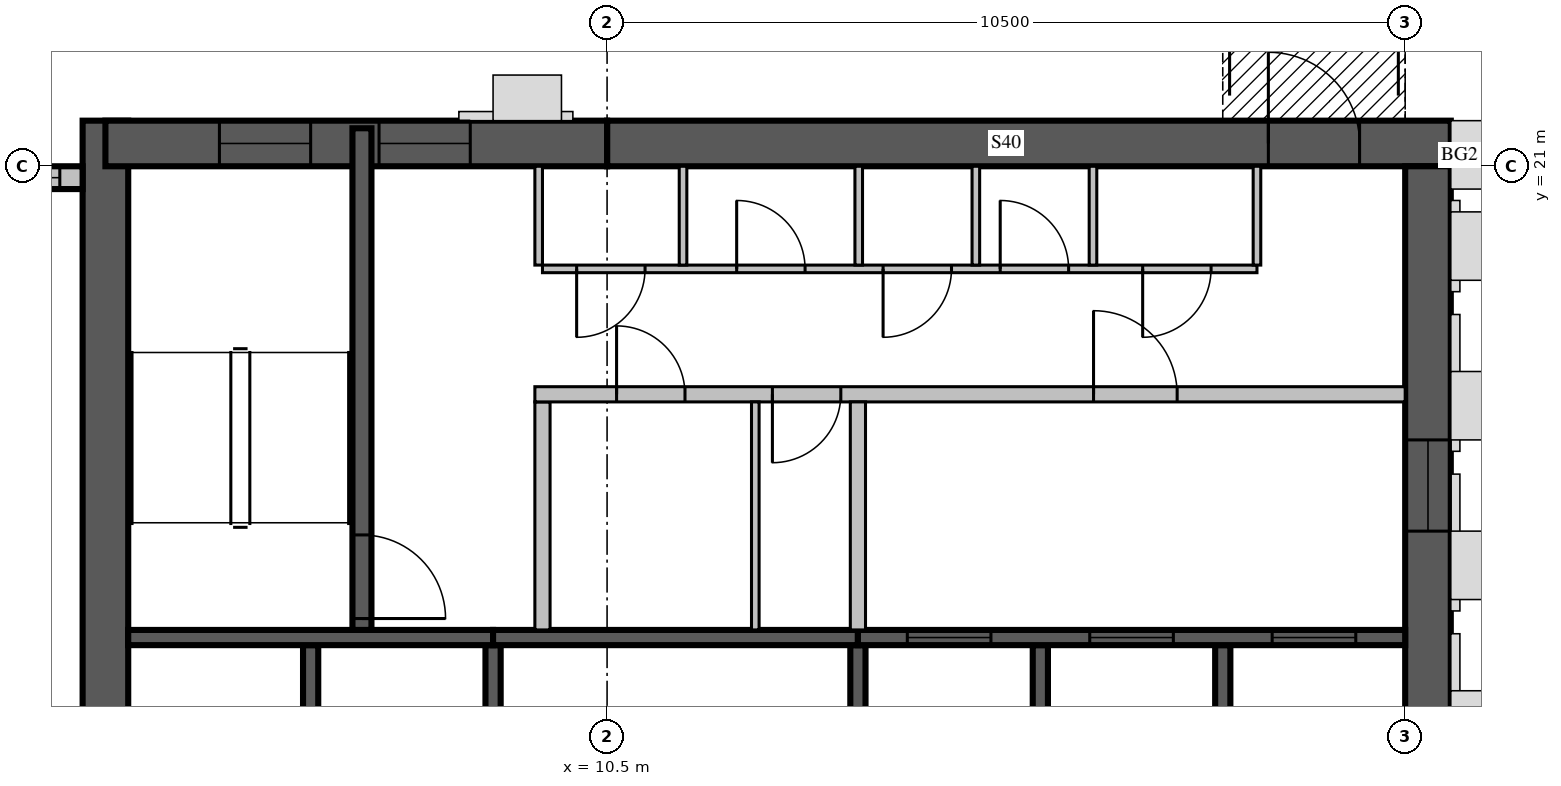
"""IFC4 building model, lengths in metres.
Left out: names, types, materials, properties, quantities, classifications, styles, units other than length and angle.
Written with IfcOpenShell. Run it as: python <this file> out.ifc"""

import sys

from ifc_helpers import new_model, si_unit, direction, frame, frame_2d, origin, place, context, subcontext, project, spatial, rectangle, extrude, source, transform, mapped, element, fill, save


model = new_model("IFC4")
c1 = context("Model", 3, precision=1e-05, world=origin(), true_north=direction((0.0, 1.0)))
c2 = subcontext(c1, "Body", "Model", "MODEL_VIEW")
j1 = project(units=[si_unit("LENGTHUNIT", "METRE"), si_unit("PLANEANGLEUNIT", "RADIAN")], contexts=[c1])
p1 = place(None, origin())
s1 = spatial("IfcSite", under=j1, at=p1, CompositionType="ELEMENT")
p2 = place(p1, origin())
s2 = spatial("IfcBuilding", under=s1, at=p2, CompositionType="ELEMENT")
p3 = place(p2, frame((0.0, 0.0, 323.0)))
s3 = spatial("IfcBuildingStorey", under=s2, at=p3, CompositionType="ELEMENT", Elevation=323.0)
m1 = source(origin(), c2, "Body", "SweptSolid", [
    extrude(rectangle(XDim=17.4, YDim=0.6, at=frame_2d((8.7, 0.0))), origin(), (0.0, 0.0, 1.0), 3.5),
])
p4 = place(p3, frame((3.9, 4.2, 0.0), z_axis=(0.0, 0.0, 1.0), x_axis=(0.0, 1.0, 0.0)))
e1 = element("IfcWall", 1, at=p4, inside=s3, PredefinedType="SHEAR", context=c2, shape_type="MappedRepresentation", body=[
    mapped(m1, transform((0.0, 0.0, 0.0), scale=1.0)),
])
m2 = source(origin(), c2, "Body", "SweptSolid", [
    extrude(rectangle(XDim=2.2, YDim=2.1, at=frame_2d((1.1, 1.05))), frame((0.0, 0.31, 0.0), z_axis=(0.0, -1.0, 0.0), x_axis=(1.0, 0.0, 0.0)), (0.0, 0.0, 1.0), 0.62),
])
p5 = place(p4, frame((4.2, 0.0, 0.0)))
e2 = element("IfcOpeningElement", 2, at=p5, cuts=e1, PredefinedType="OPENING", context=c2, shape_type="MappedRepresentation", body=[
    mapped(m2, transform((0.0, 0.0, 0.0), scale=1.0)),
])
m3 = source(origin(), c2, "Body", "SweptSolid", [
    extrude(rectangle(XDim=11.1, YDim=0.6, at=frame_2d((5.55, 0.0))), origin(), (0.0, 0.0, 1.0), 3.5),
])
p6 = place(p3, frame((10.5, 21.3, 0.0), z_axis=(0.0, 0.0, 1.0), x_axis=(1.0, 0.0, 0.0)))
e3 = element("IfcWall", 3, at=p6, inside=s3, PredefinedType="SHEAR", context=c2, shape_type="MappedRepresentation", body=[
    mapped(m3, transform((0.0, 0.0, 0.0), scale=1.0)),
])
m4 = source(origin(), c2, "Body", "SweptSolid", [
    extrude(rectangle(XDim=1.2, YDim=2.1, at=frame_2d((0.6, 1.05))), frame((0.0, 0.31, 0.0), z_axis=(0.0, -1.0, 0.0), x_axis=(1.0, 0.0, 0.0)), (0.0, 0.0, 1.0), 0.62),
])
p7 = place(p6, frame((8.7, 0.0, 0.0)))
e4 = element("IfcOpeningElement", 4, at=p7, cuts=e3, PredefinedType="OPENING", context=c2, shape_type="MappedRepresentation", body=[
    mapped(m4, transform((0.0, 0.0, 0.0), scale=1.0)),
])
m5 = source(origin(), c2, "Body", "SweptSolid", [
    extrude(rectangle(XDim=10.5, YDim=0.6, at=frame_2d((5.25, 0.0))), origin(), (0.0, 0.0, 1.0), 3.5),
])
p8 = place(p3, frame((21.3, 10.5, 0.0), z_axis=(0.0, 0.0, 1.0), x_axis=(0.0, 1.0, 0.0)))
e5 = element("IfcWall", 5, at=p8, inside=s3, PredefinedType="SHEAR", context=c2, shape_type="MappedRepresentation", body=[
    mapped(m5, transform((0.0, 0.0, 0.0), scale=1.0)),
])
m6 = source(origin(), c2, "Body", "SweptSolid", [
    extrude(rectangle(XDim=1.2, YDim=2.4, at=frame_2d((0.6, 1.2))), frame((0.0, 0.31, 0.0), z_axis=(0.0, -1.0, 0.0), x_axis=(1.0, 0.0, 0.0)), (0.0, 0.0, 1.0), 0.62),
])
p9 = place(p8, frame((5.7, 0.0, 0.6)))
e6 = element("IfcOpeningElement", 6, at=p9, cuts=e5, PredefinedType="OPENING", context=c2, shape_type="MappedRepresentation", body=[
    mapped(m6, transform((0.0, 0.0, 0.0), scale=1.0)),
])
m7 = source(origin(), c2, "Body", "SweptSolid", [
    extrude(rectangle(XDim=6.6, YDim=0.6, at=frame_2d((3.3, 0.0))), origin(), (0.0, 0.0, 1.0), 3.5),
])
p10 = place(p3, frame((3.9, 21.3, 0.0), z_axis=(0.0, 0.0, 1.0), x_axis=(1.0, 0.0, 0.0)))
e7 = element("IfcWall", 7, at=p10, inside=s3, PredefinedType="SHEAR", context=c2, shape_type="MappedRepresentation", body=[
    mapped(m7, transform((0.0, 0.0, 0.0), scale=1.0)),
])
p11 = place(p10, frame((1.5, 0.0, 0.6)))
e8 = element("IfcOpeningElement", 8, at=p11, cuts=e7, PredefinedType="OPENING", context=c2, shape_type="MappedRepresentation", body=[
    mapped(m6, transform((0.0, 0.0, 0.0), scale=1.0)),
])
p12 = place(p10, frame((3.6, 0.0, 0.6)))
e9 = element("IfcOpeningElement", 9, at=p12, cuts=e7, PredefinedType="OPENING", context=c2, shape_type="MappedRepresentation", body=[
    mapped(m6, transform((0.0, 0.0, 0.0), scale=1.0)),
])
m8 = source(origin(), c2, "Body", "SweptSolid", [
    extrude(rectangle(XDim=2.9, YDim=0.3, at=frame_2d((1.45, 0.0))), origin(), (0.0, 0.0, 1.0), 3.1),
])
p13 = place(p3, frame((3.6, 20.85, 0.0), z_axis=(0.0, 0.0, 1.0), x_axis=(-1.0, 0.0, 0.0)))
e10 = element("IfcWall", 10, at=p13, inside=s3, PredefinedType="STANDARD", context=c2, shape_type="MappedRepresentation", body=[
    mapped(m8, transform((0.0, 0.0, 0.0), scale=1.0)),
])
m9 = source(origin(), c2, "Body", "SweptSolid", [
    extrude(rectangle(XDim=2.4, YDim=2.0, at=frame_2d((1.2, 1.0))), frame((0.0, 0.16, 0.0), z_axis=(0.0, -1.0, 0.0), x_axis=(1.0, 0.0, 0.0)), (0.0, 0.0, 1.0), 0.32),
])
p14 = place(p13, frame((0.3, 0.0, 0.6)))
e11 = element("IfcOpeningElement", 11, at=p14, cuts=e10, PredefinedType="OPENING", context=c2, shape_type="MappedRepresentation", body=[
    mapped(m9, transform((0.0, 0.0, 0.0), scale=1.0)),
])
m10 = source(origin(), c2, "Body", "SweptSolid", [
    extrude(rectangle(XDim=3.0, YDim=0.2, at=frame_2d((1.5, 0.0))), origin(), (0.0, 0.0, 1.0), 3.5),
])
p15 = place(p3, frame((6.6, 11.7, 0.0), z_axis=(0.0, 0.0, 1.0), x_axis=(0.0, 1.0, 0.0)))
e12 = element("IfcWall", 12, at=p15, inside=s3, PredefinedType="SOLIDWALL", context=c2, shape_type="MappedRepresentation", body=[
    mapped(m10, transform((0.0, 0.0, 0.0), scale=1.0)),
])
m11 = source(origin(), c2, "Body", "SweptSolid", [
    extrude(rectangle(XDim=3.0, YDim=0.2, at=frame_2d((1.5, 0.0))), origin(), (0.0, 0.0, 1.0), 3.1),
])
for number, where, z_axis, x_axis in (
    (13, (9.0, 11.7, 0.0), (0.0, 0.0, 1.0), (0.0, 1.0, 0.0)),
    (14, (13.8, 11.7, 0.0), (0.0, 0.0, 1.0), (0.0, 1.0, 0.0)),
):
    element("IfcWall", number, at=place(p3, frame(where, z_axis=z_axis, x_axis=x_axis)), inside=s3, PredefinedType="SOLIDWALL", context=c2, shape_type="MappedRepresentation", body=[
        mapped(m11, transform((0.0, 0.0, 0.0), scale=1.0)),
    ])
for number, where, z_axis, x_axis in (
    (15, (16.2, 11.7, 0.0), (0.0, 0.0, 1.0), (0.0, 1.0, 0.0)),
    (16, (18.6, 11.7, 0.0), (0.0, 0.0, 1.0), (0.0, 1.0, 0.0)),
):
    element("IfcWall", number, at=place(p3, frame(where, z_axis=z_axis, x_axis=x_axis)), inside=s3, PredefinedType="SOLIDWALL", context=c2, shape_type="MappedRepresentation", body=[
        mapped(m10, transform((0.0, 0.0, 0.0), scale=1.0)),
    ])
m12 = source(origin(), c2, "Body", "SweptSolid", [
    extrude(rectangle(XDim=4.8, YDim=0.2, at=frame_2d((2.4, 0.0))), origin(), (0.0, 0.0, 1.0), 3.5),
])
p16 = place(p3, frame((4.2, 14.8, 0.0), z_axis=(0.0, 0.0, 1.0), x_axis=(1.0, 0.0, 0.0)))
e17 = element("IfcWall", 17, at=p16, inside=s3, PredefinedType="SOLIDWALL", context=c2, shape_type="MappedRepresentation", body=[
    mapped(m12, transform((0.0, 0.0, 0.0), scale=1.0)),
])
m13 = source(origin(), c2, "Body", "SweptSolid", [
    extrude(rectangle(XDim=4.8, YDim=0.2, at=frame_2d((2.4, 0.0))), origin(), (0.0, 0.0, 1.0), 3.1),
])
p17 = place(p3, frame((9.0, 14.8, 0.0), z_axis=(0.0, 0.0, 1.0), x_axis=(1.0, 0.0, 0.0)))
e18 = element("IfcWall", 18, at=p17, inside=s3, PredefinedType="SOLIDWALL", context=c2, shape_type="MappedRepresentation", body=[
    mapped(m13, transform((0.0, 0.0, 0.0), scale=1.0)),
])
m14 = source(origin(), c2, "Body", "SweptSolid", [
    extrude(rectangle(XDim=7.2, YDim=0.2, at=frame_2d((3.6, 0.0))), origin(), (0.0, 0.0, 1.0), 3.5),
])
p18 = place(p3, frame((13.8, 14.8, 0.0), z_axis=(0.0, 0.0, 1.0), x_axis=(1.0, 0.0, 0.0)))
e19 = element("IfcWall", 19, at=p18, inside=s3, PredefinedType="SOLIDWALL", context=c2, shape_type="MappedRepresentation", body=[
    mapped(m14, transform((0.0, 0.0, 0.0), scale=1.0)),
])
m15 = source(origin(), c2, "Body", "SweptSolid", [
    extrude(rectangle(XDim=1.1, YDim=2.1, at=frame_2d((0.55, 1.05))), frame((0.0, 0.11, 0.0), z_axis=(0.0, -1.0, 0.0), x_axis=(1.0, 0.0, 0.0)), (0.0, 0.0, 1.0), 0.22),
])
p19 = place(p18, frame((0.65, 0.0, 0.0)))
e20 = element("IfcOpeningElement", 20, at=p19, cuts=e19, PredefinedType="OPENING", context=c2, shape_type="MappedRepresentation", body=[
    mapped(m15, transform((0.0, 0.0, 0.0), scale=1.0)),
])
p20 = place(p18, frame((3.05, 0.0, 0.0)))
e21 = element("IfcOpeningElement", 21, at=p20, cuts=e19, PredefinedType="OPENING", context=c2, shape_type="MappedRepresentation", body=[
    mapped(m15, transform((0.0, 0.0, 0.0), scale=1.0)),
])
p21 = place(p18, frame((5.45, 0.0, 0.0)))
e22 = element("IfcOpeningElement", 22, at=p21, cuts=e19, PredefinedType="OPENING", context=c2, shape_type="MappedRepresentation", body=[
    mapped(m15, transform((0.0, 0.0, 0.0), scale=1.0)),
])
m16 = source(origin(), c2, "Body", "SweptSolid", [
    extrude(rectangle(XDim=6.6, YDim=0.25, at=frame_2d((3.3, 0.0))), origin(), (0.0, 0.0, 1.0), 3.1),
])
p22 = place(p3, frame((7.275, 14.9, 0.0), z_axis=(0.0, 0.0, 1.0), x_axis=(0.0, 1.0, 0.0)))
e23 = element("IfcWall", 23, at=p22, inside=s3, PredefinedType="SOLIDWALL", context=c2, shape_type="MappedRepresentation", body=[
    mapped(m16, transform((0.0, 0.0, 0.0), scale=1.0)),
])
m17 = source(origin(), c2, "Body", "SweptSolid", [
    extrude(rectangle(XDim=1.1, YDim=2.1, at=frame_2d((0.55, 1.05))), frame((0.0, 0.135, 0.0), z_axis=(0.0, -1.0, 0.0), x_axis=(1.0, 0.0, 0.0)), (0.0, 0.0, 1.0), 0.27),
])
p23 = place(p22, frame((0.15, 0.0, 0.0)))
e24 = element("IfcOpeningElement", 24, at=p23, cuts=e23, PredefinedType="OPENING", context=c2, shape_type="MappedRepresentation", body=[
    mapped(m17, transform((0.0, 0.0, 0.0), scale=1.0)),
])
m18 = source(origin(), c2, "Body", "SweptSolid", [
    extrude(rectangle(XDim=3.0, YDim=0.2, at=frame_2d((1.5, 0.0))), origin(), (0.0, 0.0, 1.0), 3.1),
])
p24 = place(p3, frame((9.65, 14.9, 0.0), z_axis=(0.0, 0.0, 1.0), x_axis=(0.0, 1.0, 0.0)))
e25 = element("IfcWall", 25, at=p24, inside=s3, PredefinedType="PARTITIONING", context=c2, shape_type="MappedRepresentation", body=[
    mapped(m18, transform((0.0, 0.0, 0.0), scale=1.0)),
])
m19 = source(origin(), c2, "Body", "SweptSolid", [
    extrude(rectangle(XDim=11.45, YDim=0.2, at=frame_2d((5.725, 0.0))), origin(), (0.0, 0.0, 1.0), 3.1),
])
p25 = place(p3, frame((9.55, 18.0, 0.0), z_axis=(0.0, 0.0, 1.0), x_axis=(1.0, 0.0, 0.0)))
e26 = element("IfcWall", 26, at=p25, inside=s3, PredefinedType="PARTITIONING", context=c2, shape_type="MappedRepresentation", body=[
    mapped(m19, transform((0.0, 0.0, 0.0), scale=1.0)),
])
m20 = source(origin(), c2, "Body", "SweptSolid", [
    extrude(rectangle(XDim=0.9, YDim=2.1, at=frame_2d((0.45, 1.05))), frame((0.0, 0.11, 0.0), z_axis=(0.0, -1.0, 0.0), x_axis=(1.0, 0.0, 0.0)), (0.0, 0.0, 1.0), 0.22),
])
p26 = place(p25, frame((1.075, 0.0, 0.0)))
e27 = element("IfcOpeningElement", 27, at=p26, cuts=e26, PredefinedType="OPENING", context=c2, shape_type="MappedRepresentation", body=[
    mapped(m20, transform((0.0, 0.0, 0.0), scale=1.0)),
])
p27 = place(p25, frame((3.125, 0.0, 0.0)))
e28 = element("IfcOpeningElement", 28, at=p27, cuts=e26, PredefinedType="OPENING", context=c2, shape_type="MappedRepresentation", body=[
    mapped(m20, transform((0.0, 0.0, 0.0), scale=1.0)),
])
p28 = place(p25, frame((7.35, 0.0, 0.0)))
e29 = element("IfcOpeningElement", 29, at=p28, cuts=e26, PredefinedType="OPENING", context=c2, shape_type="MappedRepresentation", body=[
    mapped(m15, transform((0.0, 0.0, 0.0), scale=1.0)),
])
m21 = source(origin(), c2, "Body", "SweptSolid", [
    extrude(rectangle(XDim=9.4, YDim=0.1, at=frame_2d((4.7, 0.0))), origin(), (0.0, 0.0, 1.0), 3.1),
])
p29 = place(p3, frame((9.65, 19.65, 0.0), z_axis=(0.0, 0.0, 1.0), x_axis=(1.0, 0.0, 0.0)))
e30 = element("IfcWall", 30, at=p29, inside=s3, PredefinedType="PARTITIONING", context=c2, shape_type="MappedRepresentation", body=[
    mapped(m21, transform((0.0, 0.0, 0.0), scale=1.0)),
])
m22 = source(origin(), c2, "Body", "SweptSolid", [
    extrude(rectangle(XDim=0.9, YDim=2.1, at=frame_2d((0.45, 1.05))), frame((0.0, 0.06, 0.0), z_axis=(0.0, -1.0, 0.0), x_axis=(1.0, 0.0, 0.0)), (0.0, 0.0, 1.0), 0.12),
])
p30 = place(p29, frame((0.45, 0.0, 0.0)))
e31 = element("IfcOpeningElement", 31, at=p30, cuts=e30, PredefinedType="OPENING", context=c2, shape_type="MappedRepresentation", body=[
    mapped(m22, transform((0.0, 0.0, 0.0), scale=1.0)),
])
p31 = place(p29, frame((2.555, 0.0, 0.0)))
e32 = element("IfcOpeningElement", 32, at=p31, cuts=e30, PredefinedType="OPENING", context=c2, shape_type="MappedRepresentation", body=[
    mapped(m22, transform((0.0, 0.0, 0.0), scale=1.0)),
])
p32 = place(p29, frame((4.481, 0.0, 0.0)))
e33 = element("IfcOpeningElement", 33, at=p32, cuts=e30, PredefinedType="OPENING", context=c2, shape_type="MappedRepresentation", body=[
    mapped(m22, transform((0.0, 0.0, 0.0), scale=1.0)),
])
p33 = place(p29, frame((6.022, 0.0, 0.0)))
e34 = element("IfcOpeningElement", 34, at=p33, cuts=e30, PredefinedType="OPENING", context=c2, shape_type="MappedRepresentation", body=[
    mapped(m22, transform((0.0, 0.0, 0.0), scale=1.0)),
])
p34 = place(p29, frame((7.896, 0.0, 0.0)))
e35 = element("IfcOpeningElement", 35, at=p34, cuts=e30, PredefinedType="OPENING", context=c2, shape_type="MappedRepresentation", body=[
    mapped(m22, transform((0.0, 0.0, 0.0), scale=1.0)),
])
m23 = source(origin(), c2, "Body", "SweptSolid", [
    extrude(rectangle(XDim=1.3, YDim=0.1, at=frame_2d((0.65, 0.0))), origin(), (0.0, 0.0, 1.0), 3.1),
])
for number, where, z_axis, x_axis in (
    (36, (11.499, 19.7, 0.0), (0.0, 0.0, 1.0), (0.0, 1.0, 0.0)),
    (37, (13.811, 19.7, 0.0), (0.0, 0.0, 1.0), (0.0, 1.0, 0.0)),
    (38, (15.352, 19.7, 0.0), (0.0, 0.0, 1.0), (0.0, 1.0, 0.0)),
    (39, (16.893, 19.7, 0.0), (0.0, 0.0, 1.0), (0.0, 1.0, 0.0)),
    (40, (9.6, 19.7, 0.0), (0.0, 0.0, 1.0), (0.0, 1.0, 0.0)),
    (41, (19.05, 19.7, 0.0), (0.0, 0.0, 1.0), (0.0, 1.0, 0.0)),
):
    element("IfcWall", number, at=place(p3, frame(where, z_axis=z_axis, x_axis=x_axis)), inside=s3, PredefinedType="PARTITIONING", context=c2, shape_type="MappedRepresentation", body=[
        mapped(m23, transform((0.0, 0.0, 0.0), scale=1.0)),
    ])
p35 = place(p3, frame((13.8, 14.9, 0.0), z_axis=(0.0, 0.0, 1.0), x_axis=(0.0, 1.0, 0.0)))
e42 = element("IfcWall", 42, at=p35, inside=s3, PredefinedType="PARTITIONING", context=c2, shape_type="MappedRepresentation", body=[
    mapped(m18, transform((0.0, 0.0, 0.0), scale=1.0)),
])
m24 = source(origin(), c2, "Body", "SweptSolid", [
    extrude(rectangle(XDim=3.0, YDim=0.1, at=frame_2d((1.5, 0.0))), origin(), (0.0, 0.0, 1.0), 3.1),
])
p36 = place(p3, frame((12.45, 14.9, 0.0), z_axis=(0.0, 0.0, 1.0), x_axis=(0.0, 1.0, 0.0)))
e43 = element("IfcWall", 43, at=p36, inside=s3, PredefinedType="PARTITIONING", context=c2, shape_type="MappedRepresentation", body=[
    mapped(m24, transform((0.0, 0.0, 0.0), scale=1.0)),
])
m25 = source(origin(), c2, "Body", "SweptSolid", [
    extrude(rectangle(XDim=2.4, YDim=2.0, at=frame_2d((1.2, 1.0))), frame((0.0, 0.03, 0.0), z_axis=(0.0, -1.0, 0.0), x_axis=(1.0, 0.0, 0.0)), (0.0, 0.0, 1.0), 0.06),
])
p37 = place(p14, origin())
e44 = element("IfcWindow", 44, at=p37, inside=s3, PartitioningType="SINGLE_PANEL", PredefinedType="WINDOW", context=c2, shape_type="MappedRepresentation", body=[
    mapped(m25, transform((0.0, 0.0, 0.0), scale=1.0)),
])
fill(e11, e44)
m26 = source(origin(), c2, "Body", "SweptSolid", [
    extrude(rectangle(XDim=1.1, YDim=2.1, at=frame_2d((0.55, 1.05))), frame((0.0, 0.025, 0.0), z_axis=(0.0, -1.0, 0.0), x_axis=(1.0, 0.0, 0.0)), (0.0, 0.0, 1.0), 0.05),
])
p38 = place(p19, origin())
e45 = element("IfcDoor", 45, at=p38, inside=s3, OperationType="SLIDING_TO_LEFT", PredefinedType="DOOR", context=c2, shape_type="MappedRepresentation", body=[
    mapped(m26, transform((0.0, 0.0, 0.0), scale=1.0)),
])
fill(e20, e45)
p39 = place(p20, origin())
e46 = element("IfcDoor", 46, at=p39, inside=s3, OperationType="SLIDING_TO_LEFT", PredefinedType="DOOR", context=c2, shape_type="MappedRepresentation", body=[
    mapped(m26, transform((0.0, 0.0, 0.0), scale=1.0)),
])
fill(e21, e46)
p40 = place(p21, origin())
e47 = element("IfcDoor", 47, at=p40, inside=s3, OperationType="SLIDING_TO_LEFT", PredefinedType="DOOR", context=c2, shape_type="MappedRepresentation", body=[
    mapped(m26, transform((0.0, 0.0, 0.0), scale=1.0)),
])
fill(e22, e47)
p41 = place(p23, origin())
e48 = element("IfcDoor", 48, at=p41, inside=s3, OperationType="SINGLE_SWING_RIGHT", PredefinedType="DOOR", context=c2, shape_type="MappedRepresentation", body=[
    mapped(m26, transform((0.0, 0.0, 0.0), scale=1.0)),
])
fill(e24, e48)
m27 = source(origin(), c2, "Body", "SweptSolid", [
    extrude(rectangle(XDim=0.9, YDim=2.1, at=frame_2d((0.45, 1.05))), frame((0.0, 0.025, 0.0), z_axis=(0.0, -1.0, 0.0), x_axis=(1.0, 0.0, 0.0)), (0.0, 0.0, 1.0), 0.05),
])
p42 = place(p26, origin())
e49 = element("IfcDoor", 49, at=p42, inside=s3, OperationType="SINGLE_SWING_LEFT", PredefinedType="DOOR", context=c2, shape_type="MappedRepresentation", body=[
    mapped(m27, transform((0.0, 0.0, 0.0), scale=1.0)),
])
fill(e27, e49)
p43 = place(p27, origin())
e50 = element("IfcDoor", 50, at=p43, inside=s3, OperationType="SINGLE_SWING_RIGHT", PredefinedType="DOOR", context=c2, shape_type="MappedRepresentation", body=[
    mapped(m27, transform((0.0, 0.0, 0.0), scale=1.0)),
])
fill(e28, e50)
p44 = place(p28, origin())
e51 = element("IfcDoor", 51, at=p44, inside=s3, OperationType="SINGLE_SWING_LEFT", PredefinedType="DOOR", context=c2, shape_type="MappedRepresentation", body=[
    mapped(m26, transform((0.0, 0.0, 0.0), scale=1.0)),
])
fill(e29, e51)
p45 = place(p30, origin())
e52 = element("IfcDoor", 52, at=p45, inside=s3, OperationType="SINGLE_SWING_RIGHT", PredefinedType="DOOR", context=c2, shape_type="MappedRepresentation", body=[
    mapped(m27, transform((0.0, 0.0, 0.0), scale=1.0)),
])
fill(e31, e52)
p46 = place(p31, origin())
e53 = element("IfcDoor", 53, at=p46, inside=s3, OperationType="SINGLE_SWING_LEFT", PredefinedType="DOOR", context=c2, shape_type="MappedRepresentation", body=[
    mapped(m27, transform((0.0, 0.0, 0.0), scale=1.0)),
])
fill(e32, e53)
p47 = place(p32, origin())
e54 = element("IfcDoor", 54, at=p47, inside=s3, OperationType="SINGLE_SWING_RIGHT", PredefinedType="DOOR", context=c2, shape_type="MappedRepresentation", body=[
    mapped(m27, transform((0.0, 0.0, 0.0), scale=1.0)),
])
fill(e33, e54)
p48 = place(p33, origin())
e55 = element("IfcDoor", 55, at=p48, inside=s3, OperationType="SINGLE_SWING_LEFT", PredefinedType="DOOR", context=c2, shape_type="MappedRepresentation", body=[
    mapped(m27, transform((0.0, 0.0, 0.0), scale=1.0)),
])
fill(e34, e55)
p49 = place(p34, origin())
e56 = element("IfcDoor", 56, at=p49, inside=s3, OperationType="SINGLE_SWING_RIGHT", PredefinedType="DOOR", context=c2, shape_type="MappedRepresentation", body=[
    mapped(m27, transform((0.0, 0.0, 0.0), scale=1.0)),
])
fill(e35, e56)
m28 = source(origin(), c2, "Body", "SweptSolid", [
    extrude(rectangle(XDim=1.2, YDim=2.1, at=frame_2d((0.6, 1.05))), frame((0.0, 0.025, 0.0), z_axis=(0.0, -1.0, 0.0), x_axis=(1.0, 0.0, 0.0)), (0.0, 0.0, 1.0), 0.05),
])
p50 = place(p7, origin())
e57 = element("IfcDoor", 57, at=p50, inside=s3, OperationType="SINGLE_SWING_LEFT", PredefinedType="DOOR", context=c2, shape_type="MappedRepresentation", body=[
    mapped(m28, transform((0.0, 0.0, 0.0), scale=1.0)),
])
fill(e4, e57)
m29 = source(origin(), c2, "Body", "SweptSolid", [
    extrude(rectangle(XDim=1.2, YDim=2.4, at=frame_2d((0.6, 1.2))), frame((0.0, 0.03, 0.0), z_axis=(0.0, -1.0, 0.0), x_axis=(1.0, 0.0, 0.0)), (0.0, 0.0, 1.0), 0.06),
])
p51 = place(p9, origin())
e58 = element("IfcWindow", 58, at=p51, inside=s3, PartitioningType="SINGLE_PANEL", PredefinedType="WINDOW", context=c2, shape_type="MappedRepresentation", body=[
    mapped(m29, transform((0.0, 0.0, 0.0), scale=1.0)),
])
fill(e6, e58)
p52 = place(p11, origin())
e59 = element("IfcWindow", 59, at=p52, inside=s3, PartitioningType="SINGLE_PANEL", PredefinedType="WINDOW", context=c2, shape_type="MappedRepresentation", body=[
    mapped(m29, transform((0.0, 0.0, 0.0), scale=1.0)),
])
fill(e8, e59)
p53 = place(p12, origin())
e60 = element("IfcWindow", 60, at=p53, inside=s3, PartitioningType="SINGLE_PANEL", PredefinedType="WINDOW", context=c2, shape_type="MappedRepresentation", body=[
    mapped(m29, transform((0.0, 0.0, 0.0), scale=1.0)),
])
fill(e9, e60)
save(model, sys.argv[1])
